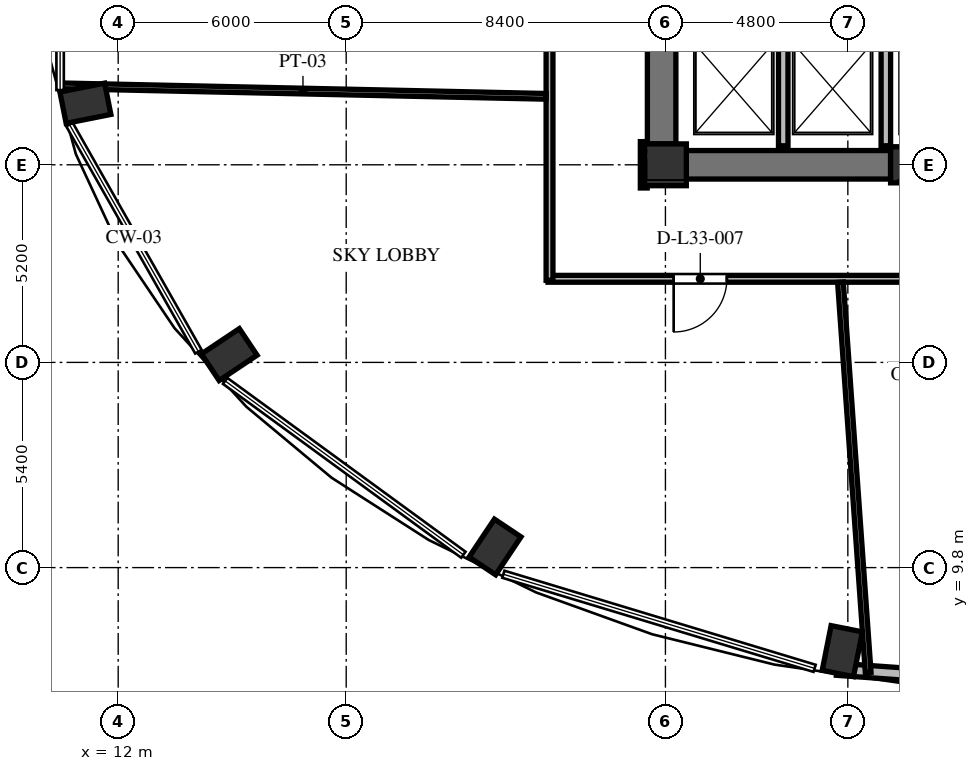
"""IFC4 building model, lengths in metres.
Left out: names, types, materials, properties, quantities, classifications, styles, units other than length and angle.
Written with IfcOpenShell. Run it as: python <this file> out.ifc"""

import sys

from ifc_helpers import new_model, si_unit, direction, frame, frame_2d, origin, origin_2d, place, context, subcontext, project, spatial, rectangle, extrude, element, fill, save


model = new_model("IFC4")
c1 = context("Model", 3, precision=1e-05, world=origin(), true_north=direction((0.0, 1.0)))
c2 = subcontext(c1, "Body", "Model", "MODEL_VIEW")
j1 = project(units=[si_unit("LENGTHUNIT", "METRE"), si_unit("PLANEANGLEUNIT", "RADIAN")], contexts=[c1])
p1 = place(None, origin())
s1 = spatial("IfcSite", under=j1, at=p1, CompositionType="ELEMENT")
p2 = place(p1, origin())
s2 = spatial("IfcBuilding", under=s1, at=p2, CompositionType="ELEMENT")
p3 = place(p2, frame((0.0, 0.0, 129.168)))
s3 = spatial("IfcBuildingStorey", under=s2, at=p3, CompositionType="ELEMENT", Elevation=129.168)
for number, where, z_axis, x_axis in (
    (1, (11.137, 22.02, 0.0), (0.0, 0.0, 1.0), (-0.981, -0.195, 0.0)),
    (2, (14.922, 15.405, 0.0), (0.0, 0.0, 1.0), (-0.831, -0.556, 0.0)),
    (3, (21.916, 10.343, 0.0), (0.0, 0.0, 1.0), (-0.556, -0.831, 0.0)),
    (4, (31.054, 7.603, 0.0), (0.0, 0.0, 1.0), (-0.195, -0.981, 0.0)),
):
    element("IfcColumn", number, at=place(p3, frame(where, z_axis=z_axis, x_axis=x_axis)), inside=s3, PredefinedType="COLUMN", context=c2, shape_type="SweptSolid", body=[
        extrude(rectangle(XDim=1.2, YDim=0.84, at=origin_2d()), origin(), (0.0, 0.0, 1.0), 3.648),
    ])
p4 = place(p3, frame((26.4, 20.4, 0.0), z_axis=(0.0, 0.0, 1.0), x_axis=(1.0, 0.0, 0.0)))
e5 = element("IfcColumn", 5, at=p4, inside=s3, PredefinedType="COLUMN", context=c2, shape_type="SweptSolid", body=[
    extrude(rectangle(XDim=1.1, YDim=1.1, at=origin_2d()), origin(), (0.0, 0.0, 1.0), 3.648),
])
p5 = place(p3, frame((32.8, 20.4, 0.0), z_axis=(0.0, 0.0, 1.0), x_axis=(1.0, 0.0, 0.0)))
e6 = element("IfcColumn", 6, at=p5, inside=s3, PredefinedType="COLUMN", context=c2, shape_type="SweptSolid", body=[
    extrude(rectangle(XDim=0.95, YDim=0.95, at=origin_2d()), origin(), (0.0, 0.0, 1.0), 3.648),
])
p6 = place(p3, frame((26.3, 20.95, 0.0), z_axis=(0.0, 0.0, 1.0), x_axis=(0.0, 1.0, 0.0)))
e7 = element("IfcWall", 7, at=p6, inside=s3, PredefinedType="SHEAR", context=c2, shape_type="SweptSolid", body=[
    extrude(rectangle(XDim=14.1, YDim=0.75, at=frame_2d((7.05, 0.0))), origin(), (0.0, 0.0, 1.0), 3.648),
])
p7 = place(p6, frame((6.5, 0.0, 0.0)))
e8 = element("IfcOpeningElement", 8, at=p7, cuts=e7, PredefinedType="OPENING", context=c2, shape_type="SweptSolid", body=[
    extrude(rectangle(XDim=1.2, YDim=2.15, at=frame_2d((0.6, 1.075))), frame((0.0, 0.385, 0.0), z_axis=(0.0, -1.0, 0.0), x_axis=(1.0, 0.0, 0.0)), (0.0, 0.0, 1.0), 0.77),
])
p8 = place(p6, frame((9.6, 0.0, 0.0)))
e9 = element("IfcOpeningElement", 9, at=p8, cuts=e7, PredefinedType="OPENING", context=c2, shape_type="SweptSolid", body=[
    extrude(rectangle(XDim=1.3, YDim=2.2, at=frame_2d((0.65, 1.1))), frame((0.0, 0.385, 0.0), z_axis=(0.0, -1.0, 0.0), x_axis=(1.0, 0.0, 0.0)), (0.0, 0.0, 1.0), 0.77),
])
p9 = place(p6, frame((3.26, 0.0, 0.0)))
e10 = element("IfcOpeningElement", 10, at=p9, cuts=e7, PredefinedType="OPENING", context=c2, shape_type="SweptSolid", body=[
    extrude(rectangle(XDim=1.3, YDim=2.2, at=frame_2d((0.65, 1.1))), frame((0.0, 0.385, 0.0), z_axis=(0.0, -1.0, 0.0), x_axis=(1.0, 0.0, 0.0)), (0.0, 0.0, 1.0), 0.77),
])
p10 = place(p3, frame((26.95, 20.4, 0.0), z_axis=(0.0, 0.0, 1.0), x_axis=(1.0, 0.0, 0.0)))
e11 = element("IfcWall", 11, at=p10, inside=s3, PredefinedType="SHEAR", context=c2, shape_type="SweptSolid", body=[
    extrude(rectangle(XDim=5.375, YDim=0.75, at=frame_2d((2.688, 0.0))), origin(), (0.0, 0.0, 1.0), 3.648),
])
p11 = place(p3, frame((30.909, 7.125, 0.0), z_axis=(0.0, 0.0, 1.0), x_axis=(0.997431890304, -0.071621394884, 0.0)))
e12 = element("IfcWall", 12, at=p11, inside=s3, PredefinedType="SOLIDWALL", context=c2, shape_type="SweptSolid", body=[
    extrude(rectangle(XDim=5.284, YDim=0.32, at=frame_2d((2.642, 0.0))), origin(), (0.0, 0.0, 1.0), 3.198),
])
p12 = place(p11, frame((2.042, 0.0, 0.85)))
e13 = element("IfcOpeningElement", 13, at=p12, cuts=e12, PredefinedType="OPENING", context=c2, shape_type="SweptSolid", body=[
    extrude(rectangle(XDim=1.2, YDim=2.2, at=frame_2d((0.6, 1.1))), frame((0.0, 0.17, 0.0), z_axis=(0.0, -1.0, 0.0), x_axis=(1.0, 0.0, 0.0)), (0.0, 0.0, 1.0), 0.34),
])
for number, where, z_axis, x_axis in (
    (14, (29.5, 20.9, 0.0), (0.0, 0.0, 1.0), (0.0, 1.0, 0.0)),
    (15, (32.2, 20.9, 0.0), (0.0, 0.0, 1.0), (0.0, 1.0, 0.0)),
):
    element("IfcWall", number, at=place(p3, frame(where, z_axis=z_axis, x_axis=x_axis)), inside=s3, PredefinedType="SOLIDWALL", context=c2, shape_type="SweptSolid", body=[
        extrude(rectangle(XDim=2.8, YDim=0.25, at=frame_2d((1.4, 0.0))), origin(), (0.0, 0.0, 1.0), 3.198),
    ])
p13 = place(p3, frame((25.83, 21.01, 0.0), z_axis=(0.0, 0.0, 1.0), x_axis=(0.0, -1.0, 0.0)))
e16 = element("IfcWall", 16, at=p13, inside=s3, PredefinedType="PARTITIONING", context=c2, shape_type="SweptSolid", body=[
    extrude(rectangle(XDim=1.22, YDim=0.18, at=frame_2d((0.61, 0.0))), origin(), (0.0, 0.0, 1.0), 3.198),
])
p14 = place(p3, frame((45.24, 17.4, 0.0), z_axis=(0.0, 0.0, 1.0), x_axis=(-1.0, 0.0, 0.0)))
e17 = element("IfcWall", 17, at=p14, inside=s3, PredefinedType="PARTITIONING", context=c2, shape_type="SweptSolid", body=[
    extrude(rectangle(XDim=21.93, YDim=0.18, at=frame_2d((10.965, 0.0))), origin(), (0.0, 0.0, 1.0), 2.823),
])
p15 = place(p14, frame((17.223, 0.0, 0.0)))
e18 = element("IfcOpeningElement", 18, at=p15, cuts=e17, PredefinedType="OPENING", context=c2, shape_type="SweptSolid", body=[
    extrude(rectangle(XDim=1.4, YDim=2.2, at=frame_2d((0.7, 1.1))), frame((0.0, 0.1, 0.0), z_axis=(0.0, -1.0, 0.0), x_axis=(1.0, 0.0, 0.0)), (0.0, 0.0, 1.0), 0.2),
])
p16 = place(p14, frame((9.212, 0.0, 0.0)))
e19 = element("IfcOpeningElement", 19, at=p16, cuts=e17, PredefinedType="OPENING", context=c2, shape_type="SweptSolid", body=[
    extrude(rectangle(XDim=1.05, YDim=2.15, at=frame_2d((0.525, 1.075))), frame((0.0, 0.1, 0.0), z_axis=(0.0, -1.0, 0.0), x_axis=(1.0, 0.0, 0.0)), (0.0, 0.0, 1.0), 0.2),
])
p17 = place(p14, frame((2.079, 0.0, 0.0)))
e20 = element("IfcOpeningElement", 20, at=p17, cuts=e17, PredefinedType="OPENING", context=c2, shape_type="SweptSolid", body=[
    extrude(rectangle(XDim=1.4, YDim=2.2, at=frame_2d((0.7, 1.1))), frame((0.0, 0.1, 0.0), z_axis=(0.0, -1.0, 0.0), x_axis=(1.0, 0.0, 0.0)), (0.0, 0.0, 1.0), 0.2),
])
p18 = place(p3, frame((23.35, 17.36, 0.0), z_axis=(0.0, 0.0, 1.0), x_axis=(0.0, 1.0, 0.0)))
e21 = element("IfcWall", 21, at=p18, inside=s3, PredefinedType="PARTITIONING", context=c2, shape_type="SweptSolid", body=[
    extrude(rectangle(XDim=9.28, YDim=0.18, at=frame_2d((4.64, 0.0))), origin(), (0.0, 0.0, 1.0), 3.198),
])
p19 = place(p3, frame((10.465, 22.479, 0.0), z_axis=(0.0, 0.0, 1.0), x_axis=(0.999765147572, -0.021671402821, 0.0)))
e22 = element("IfcWall", 22, at=p19, inside=s3, PredefinedType="PARTITIONING", context=c2, shape_type="SweptSolid", body=[
    extrude(rectangle(XDim=12.798, YDim=0.15, at=frame_2d((6.399, 0.0))), origin(), (0.0, 0.0, 1.0), 3.198),
])
p20 = place(p3, frame((31.735, 7.038, 0.0), z_axis=(0.0, 0.0, 1.0), x_axis=(-0.070862904564, 0.997486064442, 0.0)))
e23 = element("IfcWall", 23, at=p20, inside=s3, PredefinedType="PARTITIONING", context=c2, shape_type="SweptSolid", body=[
    extrude(rectangle(XDim=10.298, YDim=0.15, at=frame_2d((5.149, 0.0))), origin(), (0.0, 0.0, 1.0), 2.583),
])
p21 = place(p15, origin())
e24 = element("IfcDoor", 24, at=p21, inside=s3, OperationType="SINGLE_SWING_RIGHT", PredefinedType="DOOR", context=c2, shape_type="SweptSolid", body=[
    extrude(rectangle(XDim=1.4, YDim=2.2, at=frame_2d((0.7, 1.1))), frame((0.0, 0.025, 0.0), z_axis=(0.0, -1.0, 0.0), x_axis=(1.0, 0.0, 0.0)), (0.0, 0.0, 1.0), 0.05),
])
fill(e18, e24)
save(model, sys.argv[1])
